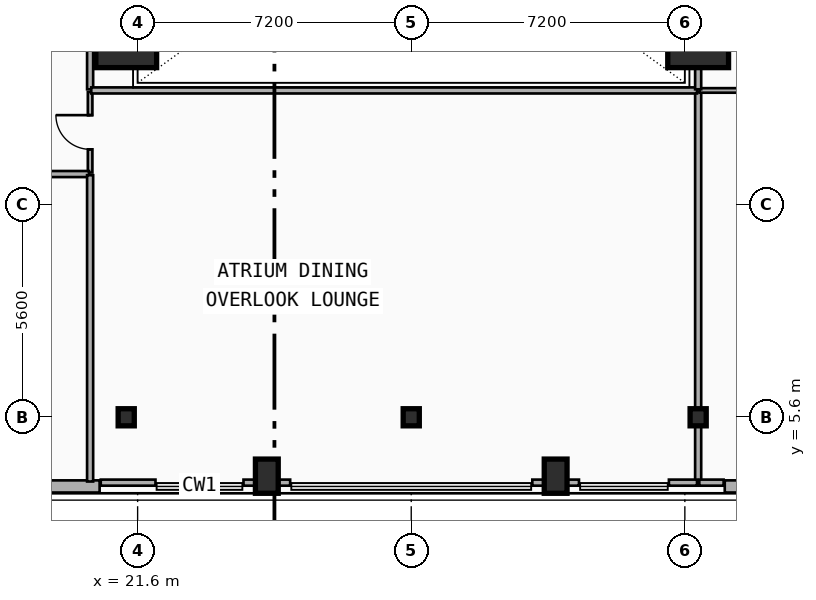
"""IFC4 building model, lengths in metres.
Left out: names, types, materials, properties, quantities, classifications, styles, units other than length and angle.
Written with IfcOpenShell. Run it as: python <this file> out.ifc"""

import sys

from ifc_helpers import new_model, si_unit, direction, frame, frame_2d, origin, origin_2d, place, context, subcontext, project, spatial, rectangle, i_section, extrude, element, fill, save


model = new_model("IFC4")
c1 = context("Model", 3, precision=1e-05, world=origin(), true_north=direction((0.0, 1.0)))
c2 = subcontext(c1, "Body", "Model", "MODEL_VIEW")
j1 = project(units=[si_unit("LENGTHUNIT", "METRE"), si_unit("PLANEANGLEUNIT", "RADIAN")], contexts=[c1])
p1 = place(None, origin())
s1 = spatial("IfcSite", under=j1, at=p1, CompositionType="ELEMENT")
p2 = place(p1, origin())
s2 = spatial("IfcBuilding", under=s1, at=p2, CompositionType="ELEMENT")
p3 = place(p2, frame((0.0, 0.0, 14.9)))
s3 = spatial("IfcBuildingStorey", under=s2, at=p3, CompositionType="ELEMENT", Elevation=14.9)
p4 = place(p3, frame((21.3, 5.6, 0.0), z_axis=(0.0, 0.0, 1.0), x_axis=(1.0, 0.0, 0.0)))
e1 = element("IfcColumn", 1, at=p4, inside=s3, PredefinedType="COLUMN", context=c2, shape_type="SweptSolid", body=[
    extrude(i_section(OverallWidth=0.424, OverallDepth=0.45, WebThickness=0.041, FlangeThickness=0.065, FilletRadius=0.015, at=origin_2d()), origin(), (0.0, 0.0, 1.0), 4.5),
])
p5 = place(p3, frame((21.3, 15.6, 0.0), z_axis=(0.0, 0.0, 1.0), x_axis=(1.0, 0.0, 0.0)))
e2 = element("IfcColumn", 2, at=p5, inside=s3, PredefinedType="COLUMN", context=c2, shape_type="SweptSolid", body=[
    extrude(rectangle(XDim=1.6, YDim=1.6, at=origin_2d()), origin(), (0.0, 0.0, 1.0), 4.5),
])
for number, where, z_axis, x_axis in (
    (3, (28.8, 5.6, 0.0), (0.0, 0.0, 1.0), (1.0, 0.0, 0.0)),
    (4, (36.35, 5.6, 0.0), (0.0, 0.0, 1.0), (1.0, 0.0, 0.0)),
):
    element("IfcColumn", number, at=place(p3, frame(where, z_axis=z_axis, x_axis=x_axis)), inside=s3, PredefinedType="COLUMN", context=c2, shape_type="SweptSolid", body=[
        extrude(i_section(OverallWidth=0.424, OverallDepth=0.45, WebThickness=0.041, FlangeThickness=0.065, FilletRadius=0.015, at=origin_2d()), origin(), (0.0, 0.0, 1.0), 4.5),
    ])
p6 = place(p3, frame((36.35, 15.6, 0.0), z_axis=(0.0, 0.0, 1.0), x_axis=(1.0, 0.0, 0.0)))
e5 = element("IfcColumn", 5, at=p6, inside=s3, PredefinedType="COLUMN", context=c2, shape_type="SweptSolid", body=[
    extrude(rectangle(XDim=1.6, YDim=1.6, at=origin_2d()), origin(), (0.0, 0.0, 1.0), 4.5),
])
for number, where, z_axis, x_axis in (
    (6, (25.0, 4.05, 0.0), (0.0, 0.0, 1.0), (1.0, 0.0, 0.0)),
    (7, (32.6, 4.05, 0.0), (0.0, 0.0, 1.0), (1.0, 0.0, 0.0)),
):
    element("IfcColumn", number, at=place(p3, frame(where, z_axis=z_axis, x_axis=x_axis)), inside=s3, PredefinedType="PILASTER", context=c2, shape_type="SweptSolid", body=[
        extrude(rectangle(XDim=0.6, YDim=0.9, at=origin_2d()), origin(), (0.0, 0.0, 1.0), 4.5),
    ])
p7 = place(p3, frame((20.6, 3.78, 0.0), z_axis=(0.0, 0.0, 1.0), x_axis=(-1.0, 0.0, 0.0)))
e8 = element("IfcWall", 8, at=p7, inside=s3, PredefinedType="SOLIDWALL", context=c2, shape_type="SweptSolid", body=[
    extrude(rectangle(XDim=17.0, YDim=0.32, at=frame_2d((8.5, 0.0))), origin(), (0.0, 0.0, 1.0), 4.2),
])
p8 = place(p7, frame((6.5, 0.0, 0.9)))
e9 = element("IfcOpeningElement", 9, at=p8, cuts=e8, PredefinedType="OPENING", context=c2, shape_type="SweptSolid", body=[
    extrude(rectangle(XDim=2.4, YDim=1.8, at=frame_2d((1.2, 0.9))), frame((0.0, 0.17, 0.0), z_axis=(0.0, -1.0, 0.0), x_axis=(1.0, 0.0, 0.0)), (0.0, 0.0, 1.0), 0.34),
])
p9 = place(p3, frame((54.0, 3.78, 0.0), z_axis=(0.0, 0.0, 1.0), x_axis=(-1.0, 0.0, 0.0)))
e10 = element("IfcWall", 10, at=p9, inside=s3, PredefinedType="SOLIDWALL", context=c2, shape_type="SweptSolid", body=[
    extrude(rectangle(XDim=16.95, YDim=0.32, at=frame_2d((8.475, 0.0))), origin(), (0.0, 0.0, 1.0), 4.2),
])
p10 = place(p9, frame((9.452, 0.0, 0.9)))
e11 = element("IfcOpeningElement", 11, at=p10, cuts=e10, PredefinedType="OPENING", context=c2, shape_type="SweptSolid", body=[
    extrude(rectangle(XDim=2.4, YDim=1.8, at=frame_2d((1.2, 0.9))), frame((0.0, 0.17, 0.0), z_axis=(0.0, -1.0, 0.0), x_axis=(1.0, 0.0, 0.0)), (0.0, 0.0, 1.0), 0.34),
])
p11 = place(p9, frame((1.262, 0.0, 0.9)))
e12 = element("IfcOpeningElement", 12, at=p11, cuts=e10, PredefinedType="OPENING", context=c2, shape_type="SweptSolid", body=[
    extrude(rectangle(XDim=2.4, YDim=1.8, at=frame_2d((1.2, 0.9))), frame((0.0, 0.17, 0.0), z_axis=(0.0, -1.0, 0.0), x_axis=(1.0, 0.0, 0.0)), (0.0, 0.0, 1.0), 0.34),
])
p12 = place(p3, frame((20.35, 12.04, 0.0), z_axis=(0.0, 0.0, 1.0), x_axis=(0.0, 1.0, 0.0)))
e13 = element("IfcWall", 13, at=p12, inside=s3, PredefinedType="PARTITIONING", context=c2, shape_type="SweptSolid", body=[
    extrude(rectangle(XDim=2.12, YDim=0.12, at=frame_2d((1.06, 0.0))), origin(), (0.0, 0.0, 1.0), 3.82),
])
p13 = place(p12, frame((0.61, 0.0, 0.0)))
e14 = element("IfcOpeningElement", 14, at=p13, cuts=e13, PredefinedType="OPENING", context=c2, shape_type="SweptSolid", body=[
    extrude(rectangle(XDim=0.9, YDim=2.1, at=frame_2d((0.45, 1.05))), frame((0.0, 0.07, 0.0), z_axis=(0.0, -1.0, 0.0), x_axis=(1.0, 0.0, 0.0)), (0.0, 0.0, 1.0), 0.14),
])
p14 = place(p3, frame((36.35, 3.88, 0.0), z_axis=(0.0, 0.0, 1.0), x_axis=(0.0, 1.0, 0.0)))
e15 = element("IfcWall", 15, at=p14, inside=s3, PredefinedType="PARTITIONING", context=c2, shape_type="SweptSolid", body=[
    extrude(rectangle(XDim=10.28, YDim=0.16, at=frame_2d((5.14, 0.0))), origin(), (0.0, 0.0, 1.0), 3.366),
])
p15 = place(p3, frame((36.39, 14.2, 0.0), z_axis=(0.0, 0.0, 1.0), x_axis=(1.0, 0.0, 0.0)))
e16 = element("IfcWall", 16, at=p15, inside=s3, PredefinedType="PARTITIONING", context=c2, shape_type="SweptSolid", body=[
    extrude(rectangle(XDim=8.97, YDim=0.12, at=frame_2d((4.485, 0.0))), origin(), (0.0, 0.0, 1.0), 3.366),
])
p16 = place(p15, frame((4.035, 0.0, 0.0)))
e17 = element("IfcOpeningElement", 17, at=p16, cuts=e16, PredefinedType="OPENING", context=c2, shape_type="SweptSolid", body=[
    extrude(rectangle(XDim=0.9, YDim=2.1, at=frame_2d((0.45, 1.05))), frame((0.0, 0.07, 0.0), z_axis=(0.0, -1.0, 0.0), x_axis=(1.0, 0.0, 0.0)), (0.0, 0.0, 1.0), 0.14),
])
p17 = place(p3, frame((18.83, 12.0, 0.0), z_axis=(0.0, 0.0, 1.0), x_axis=(1.0, 0.0, 0.0)))
e18 = element("IfcWall", 18, at=p17, inside=s3, PredefinedType="PARTITIONING", context=c2, shape_type="SweptSolid", body=[
    extrude(rectangle(XDim=1.49, YDim=0.16, at=frame_2d((0.745, 0.0))), origin(), (0.0, 0.0, 1.0), 3.82),
])
p18 = place(p3, frame((20.35, 14.23, 0.0), z_axis=(0.0, 0.0, 1.0), x_axis=(0.0, 1.0, 0.0)))
e19 = element("IfcWall", 19, at=p18, inside=s3, PredefinedType="PARTITIONING", context=c2, shape_type="SweptSolid", body=[
    extrude(rectangle(XDim=11.19, YDim=0.16, at=frame_2d((5.595, 0.0))), origin(), (0.0, 0.0, 1.0), 3.172),
])
p19 = place(p3, frame((20.63, 3.88, 0.0), z_axis=(0.0, 0.0, 1.0), x_axis=(1.0, 0.0, 0.0)))
e20 = element("IfcWall", 20, at=p19, inside=s3, PredefinedType="PARTITIONING", context=c2, shape_type="SweptSolid", body=[
    extrude(rectangle(XDim=1.44, YDim=0.16, at=frame_2d((0.72, 0.0))), origin(), (0.0, 0.0, 1.0), 4.2),
])
for number, where, z_axis, x_axis in (
    (21, (24.386, 3.88, 0.0), (0.0, 0.0, 1.0), (1.0, 0.0, 0.0)),
    (22, (31.986, 3.88, 0.0), (0.0, 0.0, 1.0), (1.0, 0.0, 0.0)),
):
    element("IfcWall", number, at=place(p3, frame(where, z_axis=z_axis, x_axis=x_axis)), inside=s3, PredefinedType="PARTITIONING", context=c2, shape_type="SweptSolid", body=[
        extrude(rectangle(XDim=1.228, YDim=0.16, at=frame_2d((0.614, 0.0))), origin(), (0.0, 0.0, 1.0), 4.2),
    ])
p20 = place(p3, frame((35.58, 3.88, 0.0), z_axis=(0.0, 0.0, 1.0), x_axis=(1.0, 0.0, 0.0)))
e23 = element("IfcWall", 23, at=p20, inside=s3, PredefinedType="PARTITIONING", context=c2, shape_type="SweptSolid", body=[
    extrude(rectangle(XDim=0.74, YDim=0.16, at=frame_2d((0.37, 0.0))), origin(), (0.0, 0.0, 1.0), 4.2),
])
p21 = place(p3, frame((20.38, 14.2, 0.0), z_axis=(0.0, 0.0, 1.0), x_axis=(1.0, 0.0, 0.0)))
e24 = element("IfcWall", 24, at=p21, inside=s3, PredefinedType="PARTITIONING", context=c2, shape_type="SweptSolid", body=[
    extrude(rectangle(XDim=15.94, YDim=0.16, at=frame_2d((7.97, 0.0))), origin(), (0.0, 0.0, 1.0), 3.366),
])
p22 = place(p3, frame((20.35, 3.91, 0.0), z_axis=(0.0, 0.0, 1.0), x_axis=(0.0, 1.0, 0.0)))
e25 = element("IfcWall", 25, at=p22, inside=s3, PredefinedType="PARTITIONING", context=c2, shape_type="SweptSolid", body=[
    extrude(rectangle(XDim=8.06, YDim=0.16, at=frame_2d((4.03, 0.0))), origin(), (0.0, 0.0, 1.0), 3.53),
])
p23 = place(p3, frame((36.38, 3.88, 0.0), z_axis=(0.0, 0.0, 1.0), x_axis=(1.0, 0.0, 0.0)))
e26 = element("IfcWall", 26, at=p23, inside=s3, PredefinedType="PARTITIONING", context=c2, shape_type="SweptSolid", body=[
    extrude(rectangle(XDim=0.64, YDim=0.16, at=frame_2d((0.32, 0.0))), origin(), (0.0, 0.0, 1.0), 4.2),
])
p24 = place(p3, frame((36.35, 14.23, 0.0), z_axis=(0.0, 0.0, 1.0), x_axis=(0.0, 1.0, 0.0)))
e27 = element("IfcWall", 27, at=p24, inside=s3, PredefinedType="PARTITIONING", context=c2, shape_type="SweptSolid", body=[
    extrude(rectangle(XDim=11.19, YDim=0.16, at=frame_2d((5.595, 0.0))), origin(), (0.0, 0.0, 1.0), 3.172),
])
p25 = place(p13, origin())
e28 = element("IfcDoor", 28, at=p25, inside=s3, OperationType="SINGLE_SWING_RIGHT", PredefinedType="DOOR", context=c2, shape_type="SweptSolid", body=[
    extrude(rectangle(XDim=0.9, YDim=2.1, at=frame_2d((0.45, 1.05))), frame((0.0, 0.025, 0.0), z_axis=(0.0, -1.0, 0.0), x_axis=(1.0, 0.0, 0.0)), (0.0, 0.0, 1.0), 0.05),
])
fill(e14, e28)
save(model, sys.argv[1])
